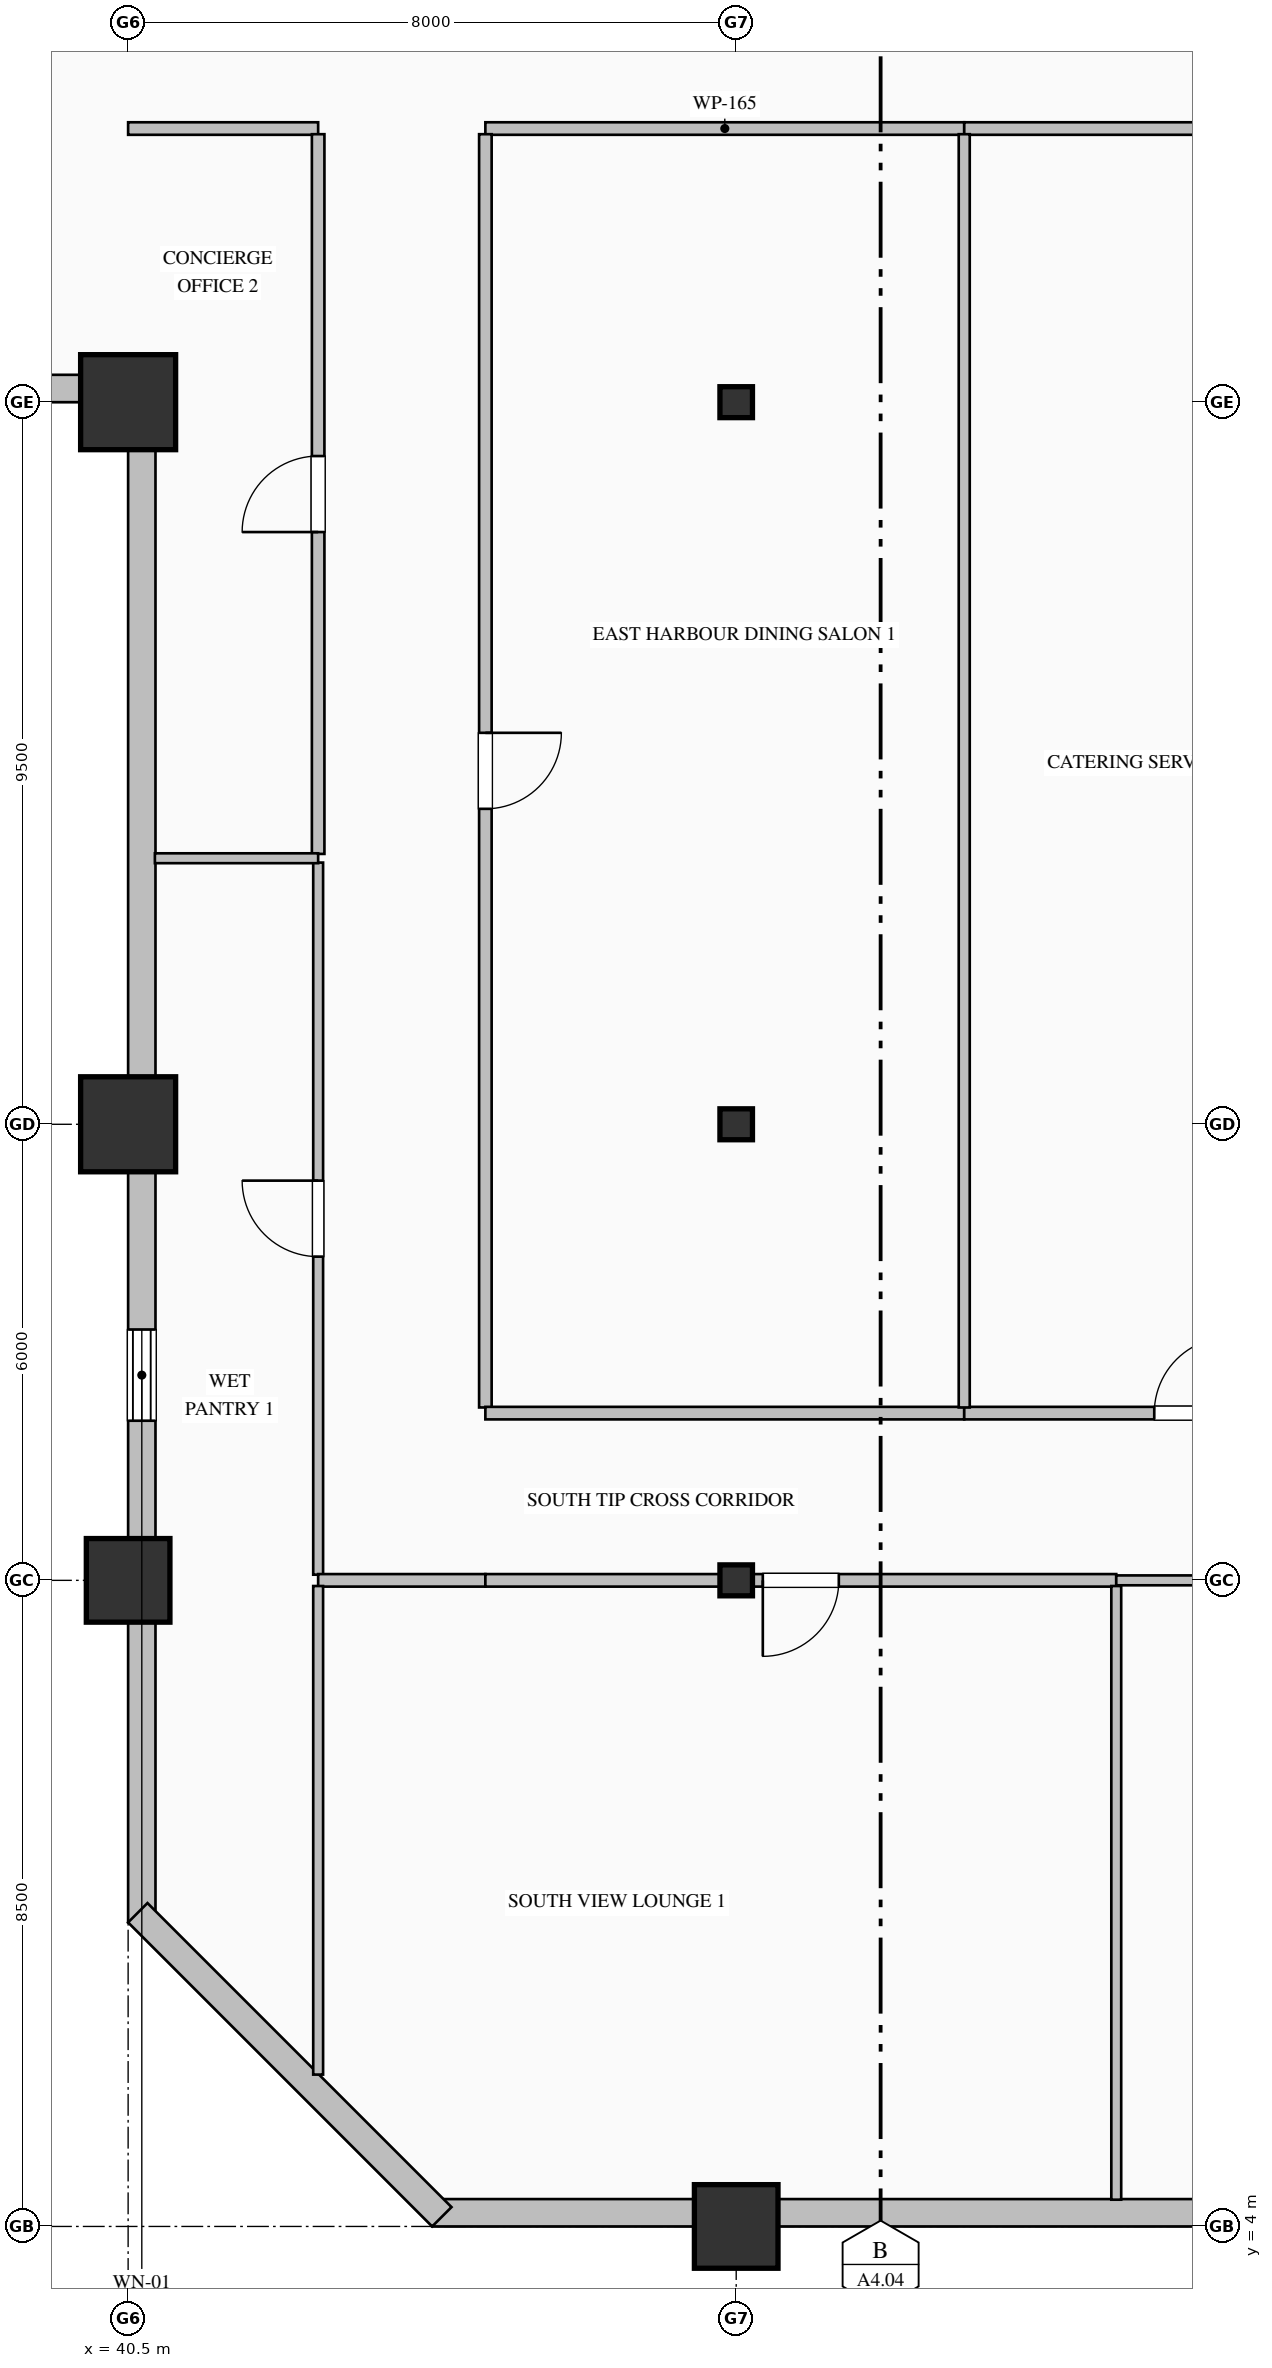
"""IFC4 building model, lengths in metres.
Left out: names, types, materials, properties, quantities, classifications, styles, units other than length and angle.
Written with IfcOpenShell. Run it as: python <this file> out.ifc"""

import sys

from ifc_helpers import new_model, si_unit, direction, frame, frame_2d, origin, origin_2d, place, context, subcontext, project, spatial, rectangle, hollow_rectangle, i_section, extrude, element, fill, save


model = new_model("IFC4")
c1 = context("Model", 3, precision=1e-05, world=origin(), true_north=direction((0.0, 1.0)))
c2 = subcontext(c1, "Body", "Model", "MODEL_VIEW")
j1 = project(units=[si_unit("LENGTHUNIT", "METRE"), si_unit("PLANEANGLEUNIT", "RADIAN")], contexts=[c1])
p1 = place(None, origin())
s1 = spatial("IfcSite", under=j1, at=p1, CompositionType="ELEMENT")
p2 = place(p1, origin())
s2 = spatial("IfcBuilding", under=s1, at=p2, CompositionType="ELEMENT")
p3 = place(p2, frame((0.0, 0.0, 76.2)))
s3 = spatial("IfcBuildingStorey", under=s2, at=p3, CompositionType="ELEMENT", Elevation=76.2)
p4 = place(p3, frame((40.5, 12.5, 0.0), z_axis=(0.0, 0.0, 1.0), x_axis=(1.0, 0.0, 0.0)))
e1 = element("IfcColumn", 1, at=p4, inside=s3, PredefinedType="COLUMN", context=c2, shape_type="SweptSolid", body=[
    extrude(hollow_rectangle(XDim=1.1, YDim=1.1, WallThickness=0.04, at=origin_2d()), origin(), (0.0, 0.0, 1.0), 4.0),
])
for number, where, z_axis, x_axis in (
    (2, (40.5, 18.5, 0.0), (0.0, 0.0, 1.0), (1.0, 0.0, 0.0)),
    (3, (40.5, 28.0, 0.0), (0.0, 0.0, 1.0), (1.0, 0.0, 0.0)),
):
    element("IfcColumn", number, at=place(p3, frame(where, z_axis=z_axis, x_axis=x_axis)), inside=s3, PredefinedType="COLUMN", context=c2, shape_type="SweptSolid", body=[
        extrude(hollow_rectangle(XDim=1.25, YDim=1.25, WallThickness=0.045, at=origin_2d()), origin(), (0.0, 0.0, 1.0), 4.0),
    ])
p5 = place(p3, frame((48.5, 4.0, 0.0), z_axis=(0.0, 0.0, 1.0), x_axis=(1.0, 0.0, 0.0)))
e4 = element("IfcColumn", 4, at=p5, inside=s3, PredefinedType="COLUMN", context=c2, shape_type="SweptSolid", body=[
    extrude(hollow_rectangle(XDim=1.1, YDim=1.1, WallThickness=0.04, at=origin_2d()), origin(), (0.0, 0.0, 1.0), 4.0),
])
for number, where, z_axis, x_axis in (
    (5, (48.5, 12.5, 0.0), (0.0, 0.0, 1.0), (1.0, 0.0, 0.0)),
    (6, (48.5, 18.5, 0.0), (0.0, 0.0, 1.0), (1.0, 0.0, 0.0)),
    (7, (48.5, 28.0, 0.0), (0.0, 0.0, 1.0), (1.0, 0.0, 0.0)),
):
    element("IfcColumn", number, at=place(p3, frame(where, z_axis=z_axis, x_axis=x_axis)), inside=s3, PredefinedType="COLUMN", context=c2, shape_type="SweptSolid", body=[
        extrude(i_section(OverallWidth=0.407, OverallDepth=0.428, WebThickness=0.02, FlangeThickness=0.035, FilletRadius=0.022, at=origin_2d()), origin(), (0.0, 0.0, 1.0), 4.0),
    ])
p6 = place(p3, frame((40.68, 8.0, 0.0), z_axis=(0.0, 0.0, 1.0), x_axis=(0.0, 1.0, 0.0)))
e8 = element("IfcWall", 8, at=p6, inside=s3, PredefinedType="SOLIDWALL", context=c2, shape_type="SweptSolid", body=[
    extrude(rectangle(XDim=20.36, YDim=0.36, at=frame_2d((10.18, 0.0))), origin(), (0.0, 0.0, 1.0), 3.05),
])
p7 = place(p6, frame((6.6, 0.0, 0.7)))
e9 = element("IfcOpeningElement", 9, at=p7, cuts=e8, PredefinedType="OPENING", context=c2, shape_type="SweptSolid", body=[
    extrude(rectangle(XDim=1.2, YDim=1.85, at=frame_2d((0.6, 0.925))), frame((0.0, 0.19, 0.0), z_axis=(0.0, -1.0, 0.0), x_axis=(1.0, 0.0, 0.0)), (0.0, 0.0, 1.0), 0.38),
])
p8 = place(p3, frame((40.52, 28.18, 0.0), z_axis=(0.0, 0.0, 1.0), x_axis=(-1.0, 0.0, 0.0)))
e10 = element("IfcWall", 10, at=p8, inside=s3, PredefinedType="SOLIDWALL", context=c2, shape_type="SweptSolid", body=[
    extrude(rectangle(XDim=36.52, YDim=0.36, at=frame_2d((18.26, 0.0))), origin(), (0.0, 0.0, 1.0), 3.05),
])
p9 = place(p8, frame((3.0, 0.0, 0.7)))
e11 = element("IfcOpeningElement", 11, at=p9, cuts=e10, PredefinedType="OPENING", context=c2, shape_type="SweptSolid", body=[
    extrude(rectangle(XDim=1.2, YDim=1.85, at=frame_2d((0.6, 0.925))), frame((0.0, 0.19, 0.0), z_axis=(0.0, -1.0, 0.0), x_axis=(1.0, 0.0, 0.0)), (0.0, 0.0, 1.0), 0.38),
])
p10 = place(p8, frame((10.2, 0.0, 0.7)))
e12 = element("IfcOpeningElement", 12, at=p10, cuts=e10, PredefinedType="OPENING", context=c2, shape_type="SweptSolid", body=[
    extrude(rectangle(XDim=1.2, YDim=1.85, at=frame_2d((0.6, 0.925))), frame((0.0, 0.19, 0.0), z_axis=(0.0, -1.0, 0.0), x_axis=(1.0, 0.0, 0.0)), (0.0, 0.0, 1.0), 0.38),
])
p11 = place(p8, frame((13.8, 0.0, 0.7)))
e13 = element("IfcOpeningElement", 13, at=p11, cuts=e10, PredefinedType="OPENING", context=c2, shape_type="SweptSolid", body=[
    extrude(rectangle(XDim=1.2, YDim=1.85, at=frame_2d((0.6, 0.925))), frame((0.0, 0.19, 0.0), z_axis=(0.0, -1.0, 0.0), x_axis=(1.0, 0.0, 0.0)), (0.0, 0.0, 1.0), 0.38),
])
p12 = place(p8, frame((17.4, 0.0, 0.7)))
e14 = element("IfcOpeningElement", 14, at=p12, cuts=e10, PredefinedType="OPENING", context=c2, shape_type="SweptSolid", body=[
    extrude(rectangle(XDim=1.2, YDim=1.85, at=frame_2d((0.6, 0.925))), frame((0.0, 0.19, 0.0), z_axis=(0.0, -1.0, 0.0), x_axis=(1.0, 0.0, 0.0)), (0.0, 0.0, 1.0), 0.38),
])
p13 = place(p8, frame((21.0, 0.0, 0.7)))
e15 = element("IfcOpeningElement", 15, at=p13, cuts=e10, PredefinedType="OPENING", context=c2, shape_type="SweptSolid", body=[
    extrude(rectangle(XDim=1.2, YDim=1.85, at=frame_2d((0.6, 0.925))), frame((0.0, 0.19, 0.0), z_axis=(0.0, -1.0, 0.0), x_axis=(1.0, 0.0, 0.0)), (0.0, 0.0, 1.0), 0.38),
])
p14 = place(p8, frame((28.2, 0.0, 0.7)))
e16 = element("IfcOpeningElement", 16, at=p14, cuts=e10, PredefinedType="OPENING", context=c2, shape_type="SweptSolid", body=[
    extrude(rectangle(XDim=1.2, YDim=1.85, at=frame_2d((0.6, 0.925))), frame((0.0, 0.19, 0.0), z_axis=(0.0, -1.0, 0.0), x_axis=(1.0, 0.0, 0.0)), (0.0, 0.0, 1.0), 0.38),
])
p15 = place(p3, frame((60.0, 4.18, 0.0), z_axis=(0.0, 0.0, 1.0), x_axis=(-1.0, 0.0, 0.0)))
e17 = element("IfcWall", 17, at=p15, inside=s3, PredefinedType="SOLIDWALL", context=c2, shape_type="SweptSolid", body=[
    extrude(rectangle(XDim=15.5, YDim=0.36, at=frame_2d((7.75, 0.0))), origin(), (0.0, 0.0, 1.0), 3.25),
])
p16 = place(p3, frame((44.627, 4.127, 0.0), z_axis=(0.0, 0.0, 1.0), x_axis=(-0.707106781187, 0.707106781187, 0.0)))
e18 = element("IfcWall", 18, at=p16, inside=s3, PredefinedType="SOLIDWALL", context=c2, shape_type="SweptSolid", body=[
    extrude(rectangle(XDim=5.657, YDim=0.36, at=frame_2d((2.828, 0.0))), origin(), (0.0, 0.0, 1.0), 3.75),
])
p17 = place(p3, frame((51.5, 31.6, 0.0), z_axis=(0.0, 0.0, 1.0), x_axis=(-1.0, 0.0, 0.0)))
e19 = element("IfcWall", 19, at=p17, inside=s3, PredefinedType="PARTITIONING", context=c2, shape_type="SweptSolid", body=[
    extrude(rectangle(XDim=6.3, YDim=0.165, at=frame_2d((3.15, 0.0))), origin(), (0.0, 0.0, 1.0), 3.75),
])
p18 = place(p3, frame((56.5, 31.6, 0.0), z_axis=(0.0, 0.0, 1.0), x_axis=(-1.0, 0.0, 0.0)))
e20 = element("IfcWall", 20, at=p18, inside=s3, PredefinedType="PARTITIONING", context=c2, shape_type="SweptSolid", body=[
    extrude(rectangle(XDim=5.0, YDim=0.165, at=frame_2d((2.5, 0.0))), origin(), (0.0, 0.0, 1.0), 3.75),
])
p19 = place(p3, frame((43.0, 31.6, 0.0), z_axis=(0.0, 0.0, 1.0), x_axis=(-1.0, 0.0, 0.0)))
e21 = element("IfcWall", 21, at=p19, inside=s3, PredefinedType="PARTITIONING", context=c2, shape_type="SweptSolid", body=[
    extrude(rectangle(XDim=2.5, YDim=0.165, at=frame_2d((1.25, 0.0))), origin(), (0.0, 0.0, 1.0), 3.75),
])
p20 = place(p3, frame((45.2, 31.525, 0.0), z_axis=(0.0, 0.0, 1.0), x_axis=(0.0, -1.0, 0.0)))
e22 = element("IfcWall", 22, at=p20, inside=s3, PredefinedType="PARTITIONING", context=c2, shape_type="SweptSolid", body=[
    extrude(rectangle(XDim=16.751, YDim=0.165, at=frame_2d((8.375, 0.0))), origin(), (0.0, 0.0, 1.0), 3.75),
])
p21 = place(p20, frame((7.875, 0.0, 0.0)))
e23 = element("IfcOpeningElement", 23, at=p21, cuts=e22, PredefinedType="OPENING", context=c2, shape_type="SweptSolid", body=[
    extrude(rectangle(XDim=1.0, YDim=2.15, at=frame_2d((0.5, 1.075))), frame((0.0, 0.093, 0.0), z_axis=(0.0, -1.0, 0.0), x_axis=(1.0, 0.0, 0.0)), (0.0, 0.0, 1.0), 0.185),
])
p22 = place(p3, frame((43.0, 12.574, 0.0), z_axis=(0.0, 0.0, 1.0), x_axis=(0.0, 1.0, 0.0)))
e24 = element("IfcWall", 24, at=p22, inside=s3, PredefinedType="PARTITIONING", context=c2, shape_type="SweptSolid", body=[
    extrude(rectangle(XDim=9.369, YDim=0.13, at=frame_2d((4.684, 0.0))), origin(), (0.0, 0.0, 1.0), 3.75),
])
p23 = place(p22, frame((4.184, 0.0, 0.0)))
e25 = element("IfcOpeningElement", 25, at=p23, cuts=e24, PredefinedType="OPENING", context=c2, shape_type="SweptSolid", body=[
    extrude(rectangle(XDim=1.0, YDim=2.15, at=frame_2d((0.5, 1.075))), frame((0.0, 0.075, 0.0), z_axis=(0.0, -1.0, 0.0), x_axis=(1.0, 0.0, 0.0)), (0.0, 0.0, 1.0), 0.15),
])
p24 = place(p3, frame((43.0, 22.057, 0.0), z_axis=(0.0, 0.0, 1.0), x_axis=(0.0, 1.0, 0.0)))
e26 = element("IfcWall", 26, at=p24, inside=s3, PredefinedType="PARTITIONING", context=c2, shape_type="SweptSolid", body=[
    extrude(rectangle(XDim=9.469, YDim=0.165, at=frame_2d((4.734, 0.0))), origin(), (0.0, 0.0, 1.0), 3.75),
])
p25 = place(p24, frame((4.234, 0.0, 0.0)))
e27 = element("IfcOpeningElement", 27, at=p25, cuts=e26, PredefinedType="OPENING", context=c2, shape_type="SweptSolid", body=[
    extrude(rectangle(XDim=1.0, YDim=2.15, at=frame_2d((0.5, 1.075))), frame((0.0, 0.093, 0.0), z_axis=(0.0, -1.0, 0.0), x_axis=(1.0, 0.0, 0.0)), (0.0, 0.0, 1.0), 0.185),
])
p26 = place(p3, frame((45.2, 12.5, 0.0), z_axis=(0.0, 0.0, 1.0), x_axis=(-1.0, 0.0, 0.0)))
e28 = element("IfcWall", 28, at=p26, inside=s3, PredefinedType="PARTITIONING", context=c2, shape_type="SweptSolid", body=[
    extrude(rectangle(XDim=2.2, YDim=0.165, at=frame_2d((1.1, 0.0))), origin(), (0.0, 0.0, 1.0), 3.042),
])
p27 = place(p3, frame((45.2, 14.7, 0.0), z_axis=(0.0, 0.0, 1.0), x_axis=(1.0, 0.0, 0.0)))
e29 = element("IfcWall", 29, at=p27, inside=s3, PredefinedType="PARTITIONING", context=c2, shape_type="SweptSolid", body=[
    extrude(rectangle(XDim=6.3, YDim=0.165, at=frame_2d((3.15, 0.0))), origin(), (0.0, 0.0, 1.0), 3.75),
])
p28 = place(p3, frame((51.5, 14.7, 0.0), z_axis=(0.0, 0.0, 1.0), x_axis=(1.0, 0.0, 0.0)))
e30 = element("IfcWall", 30, at=p28, inside=s3, PredefinedType="PARTITIONING", context=c2, shape_type="SweptSolid", body=[
    extrude(rectangle(XDim=6.0, YDim=0.165, at=frame_2d((3.0, 0.0))), origin(), (0.0, 0.0, 1.0), 3.75),
])
p29 = place(p28, frame((2.5, 0.0, 0.0)))
e31 = element("IfcOpeningElement", 31, at=p29, cuts=e30, PredefinedType="OPENING", context=c2, shape_type="SweptSolid", body=[
    extrude(rectangle(XDim=1.0, YDim=2.15, at=frame_2d((0.5, 1.075))), frame((0.0, 0.093, 0.0), z_axis=(0.0, -1.0, 0.0), x_axis=(1.0, 0.0, 0.0)), (0.0, 0.0, 1.0), 0.185),
])
p30 = place(p3, frame((53.5, 12.5, 0.0), z_axis=(0.0, 0.0, 1.0), x_axis=(-1.0, 0.0, 0.0)))
e32 = element("IfcWall", 32, at=p30, inside=s3, PredefinedType="PARTITIONING", context=c2, shape_type="SweptSolid", body=[
    extrude(rectangle(XDim=8.3, YDim=0.165, at=frame_2d((4.15, 0.0))), origin(), (0.0, 0.0, 1.0), 3.042),
])
p31 = place(p30, frame((3.65, 0.0, 0.0)))
e33 = element("IfcOpeningElement", 33, at=p31, cuts=e32, PredefinedType="OPENING", context=c2, shape_type="SweptSolid", body=[
    extrude(rectangle(XDim=1.0, YDim=2.15, at=frame_2d((0.5, 1.075))), frame((0.0, 0.093, 0.0), z_axis=(0.0, -1.0, 0.0), x_axis=(1.0, 0.0, 0.0)), (0.0, 0.0, 1.0), 0.185),
])
p32 = place(p3, frame((61.5, 12.5, 0.0), z_axis=(0.0, 0.0, 1.0), x_axis=(-1.0, 0.0, 0.0)))
e34 = element("IfcWall", 34, at=p32, inside=s3, PredefinedType="PARTITIONING", context=c2, shape_type="SweptSolid", body=[
    extrude(rectangle(XDim=8.0, YDim=0.13, at=frame_2d((4.0, 0.0))), origin(), (0.0, 0.0, 1.0), 3.042),
])
p33 = place(p32, frame((3.5, 0.0, 0.0)))
e35 = element("IfcOpeningElement", 35, at=p33, cuts=e34, PredefinedType="OPENING", context=c2, shape_type="SweptSolid", body=[
    extrude(rectangle(XDim=1.0, YDim=2.15, at=frame_2d((0.5, 1.075))), frame((0.0, 0.075, 0.0), z_axis=(0.0, -1.0, 0.0), x_axis=(1.0, 0.0, 0.0)), (0.0, 0.0, 1.0), 0.15),
])
p34 = place(p3, frame((51.5, 31.525, 0.0), z_axis=(0.0, 0.0, 1.0), x_axis=(0.0, -1.0, 0.0)))
e36 = element("IfcWall", 36, at=p34, inside=s3, PredefinedType="PARTITIONING", context=c2, shape_type="SweptSolid", body=[
    extrude(rectangle(XDim=16.751, YDim=0.145, at=frame_2d((8.375, 0.0))), origin(), (0.0, 0.0, 1.0), 3.75),
])
p35 = place(p3, frame((40.852, 22.0, 0.0), z_axis=(0.0, 0.0, 1.0), x_axis=(1.0, 0.0, 0.0)))
e37 = element("IfcWall", 37, at=p35, inside=s3, PredefinedType="PARTITIONING", context=c2, shape_type="SweptSolid", body=[
    extrude(rectangle(XDim=2.148, YDim=0.13, at=frame_2d((1.074, 0.0))), origin(), (0.0, 0.0, 1.0), 3.75),
])
p36 = place(p3, frame((43.0, 12.426, 0.0), z_axis=(0.0, 0.0, 1.0), x_axis=(0.0, -1.0, 0.0)))
e38 = element("IfcWall", 38, at=p36, inside=s3, PredefinedType="PARTITIONING", context=c2, shape_type="SweptSolid", body=[
    extrude(rectangle(XDim=6.428, YDim=0.13, at=frame_2d((3.214, 0.0))), origin(), (0.0, 0.0, 1.0), 3.75),
])
p37 = place(p3, frame((53.5, 12.426, 0.0), z_axis=(0.0, 0.0, 1.0), x_axis=(0.0, -1.0, 0.0)))
e39 = element("IfcWall", 39, at=p37, inside=s3, PredefinedType="PARTITIONING", context=c2, shape_type="SweptSolid", body=[
    extrude(rectangle(XDim=8.073, YDim=0.13, at=frame_2d((4.037, 0.0))), origin(), (0.0, 0.0, 1.0), 3.75),
])
p38 = place(p7, origin())
e40 = element("IfcWindow", 40, at=p38, inside=s3, PartitioningType="DOUBLE_PANEL_VERTICAL", PredefinedType="WINDOW", context=c2, shape_type="SweptSolid", body=[
    extrude(rectangle(XDim=1.2, YDim=1.85, at=frame_2d((0.6, 0.925))), frame((0.0, 0.15, 0.0), z_axis=(0.0, -1.0, 0.0), x_axis=(1.0, 0.0, 0.0)), (0.0, 0.0, 1.0), 0.06),
])
fill(e9, e40)
p39 = place(p21, origin())
e41 = element("IfcDoor", 41, at=p39, inside=s3, OperationType="SINGLE_SWING_LEFT", PredefinedType="DOOR", context=c2, shape_type="SweptSolid", body=[
    extrude(rectangle(XDim=1.0, YDim=2.15, at=frame_2d((0.5, 1.075))), frame((0.0, 0.025, 0.0), z_axis=(0.0, -1.0, 0.0), x_axis=(1.0, 0.0, 0.0)), (0.0, 0.0, 1.0), 0.05),
])
fill(e23, e41)
p40 = place(p29, origin())
e42 = element("IfcDoor", 42, at=p40, inside=s3, OperationType="SINGLE_SWING_RIGHT", PredefinedType="DOOR", context=c2, shape_type="SweptSolid", body=[
    extrude(rectangle(XDim=1.0, YDim=2.15, at=frame_2d((0.5, 1.075))), frame((0.0, 0.025, 0.0), z_axis=(0.0, -1.0, 0.0), x_axis=(1.0, 0.0, 0.0)), (0.0, 0.0, 1.0), 0.05),
])
fill(e31, e42)
p41 = place(p23, origin())
e43 = element("IfcDoor", 43, at=p41, inside=s3, OperationType="SINGLE_SWING_RIGHT", PredefinedType="DOOR", context=c2, shape_type="SweptSolid", body=[
    extrude(rectangle(XDim=1.0, YDim=2.15, at=frame_2d((0.5, 1.075))), frame((0.0, 0.025, 0.0), z_axis=(0.0, -1.0, 0.0), x_axis=(1.0, 0.0, 0.0)), (0.0, 0.0, 1.0), 0.05),
])
fill(e25, e43)
p42 = place(p25, origin())
e44 = element("IfcDoor", 44, at=p42, inside=s3, OperationType="SINGLE_SWING_LEFT", PredefinedType="DOOR", context=c2, shape_type="SweptSolid", body=[
    extrude(rectangle(XDim=1.0, YDim=2.15, at=frame_2d((0.5, 1.075))), frame((0.0, 0.025, 0.0), z_axis=(0.0, -1.0, 0.0), x_axis=(1.0, 0.0, 0.0)), (0.0, 0.0, 1.0), 0.05),
])
fill(e27, e44)
p43 = place(p31, origin())
e45 = element("IfcDoor", 45, at=p43, inside=s3, OperationType="SINGLE_SWING_RIGHT", PredefinedType="DOOR", context=c2, shape_type="SweptSolid", body=[
    extrude(rectangle(XDim=1.0, YDim=2.15, at=frame_2d((0.5, 1.075))), frame((0.0, 0.025, 0.0), z_axis=(0.0, -1.0, 0.0), x_axis=(1.0, 0.0, 0.0)), (0.0, 0.0, 1.0), 0.05),
])
fill(e33, e45)
save(model, sys.argv[1])
